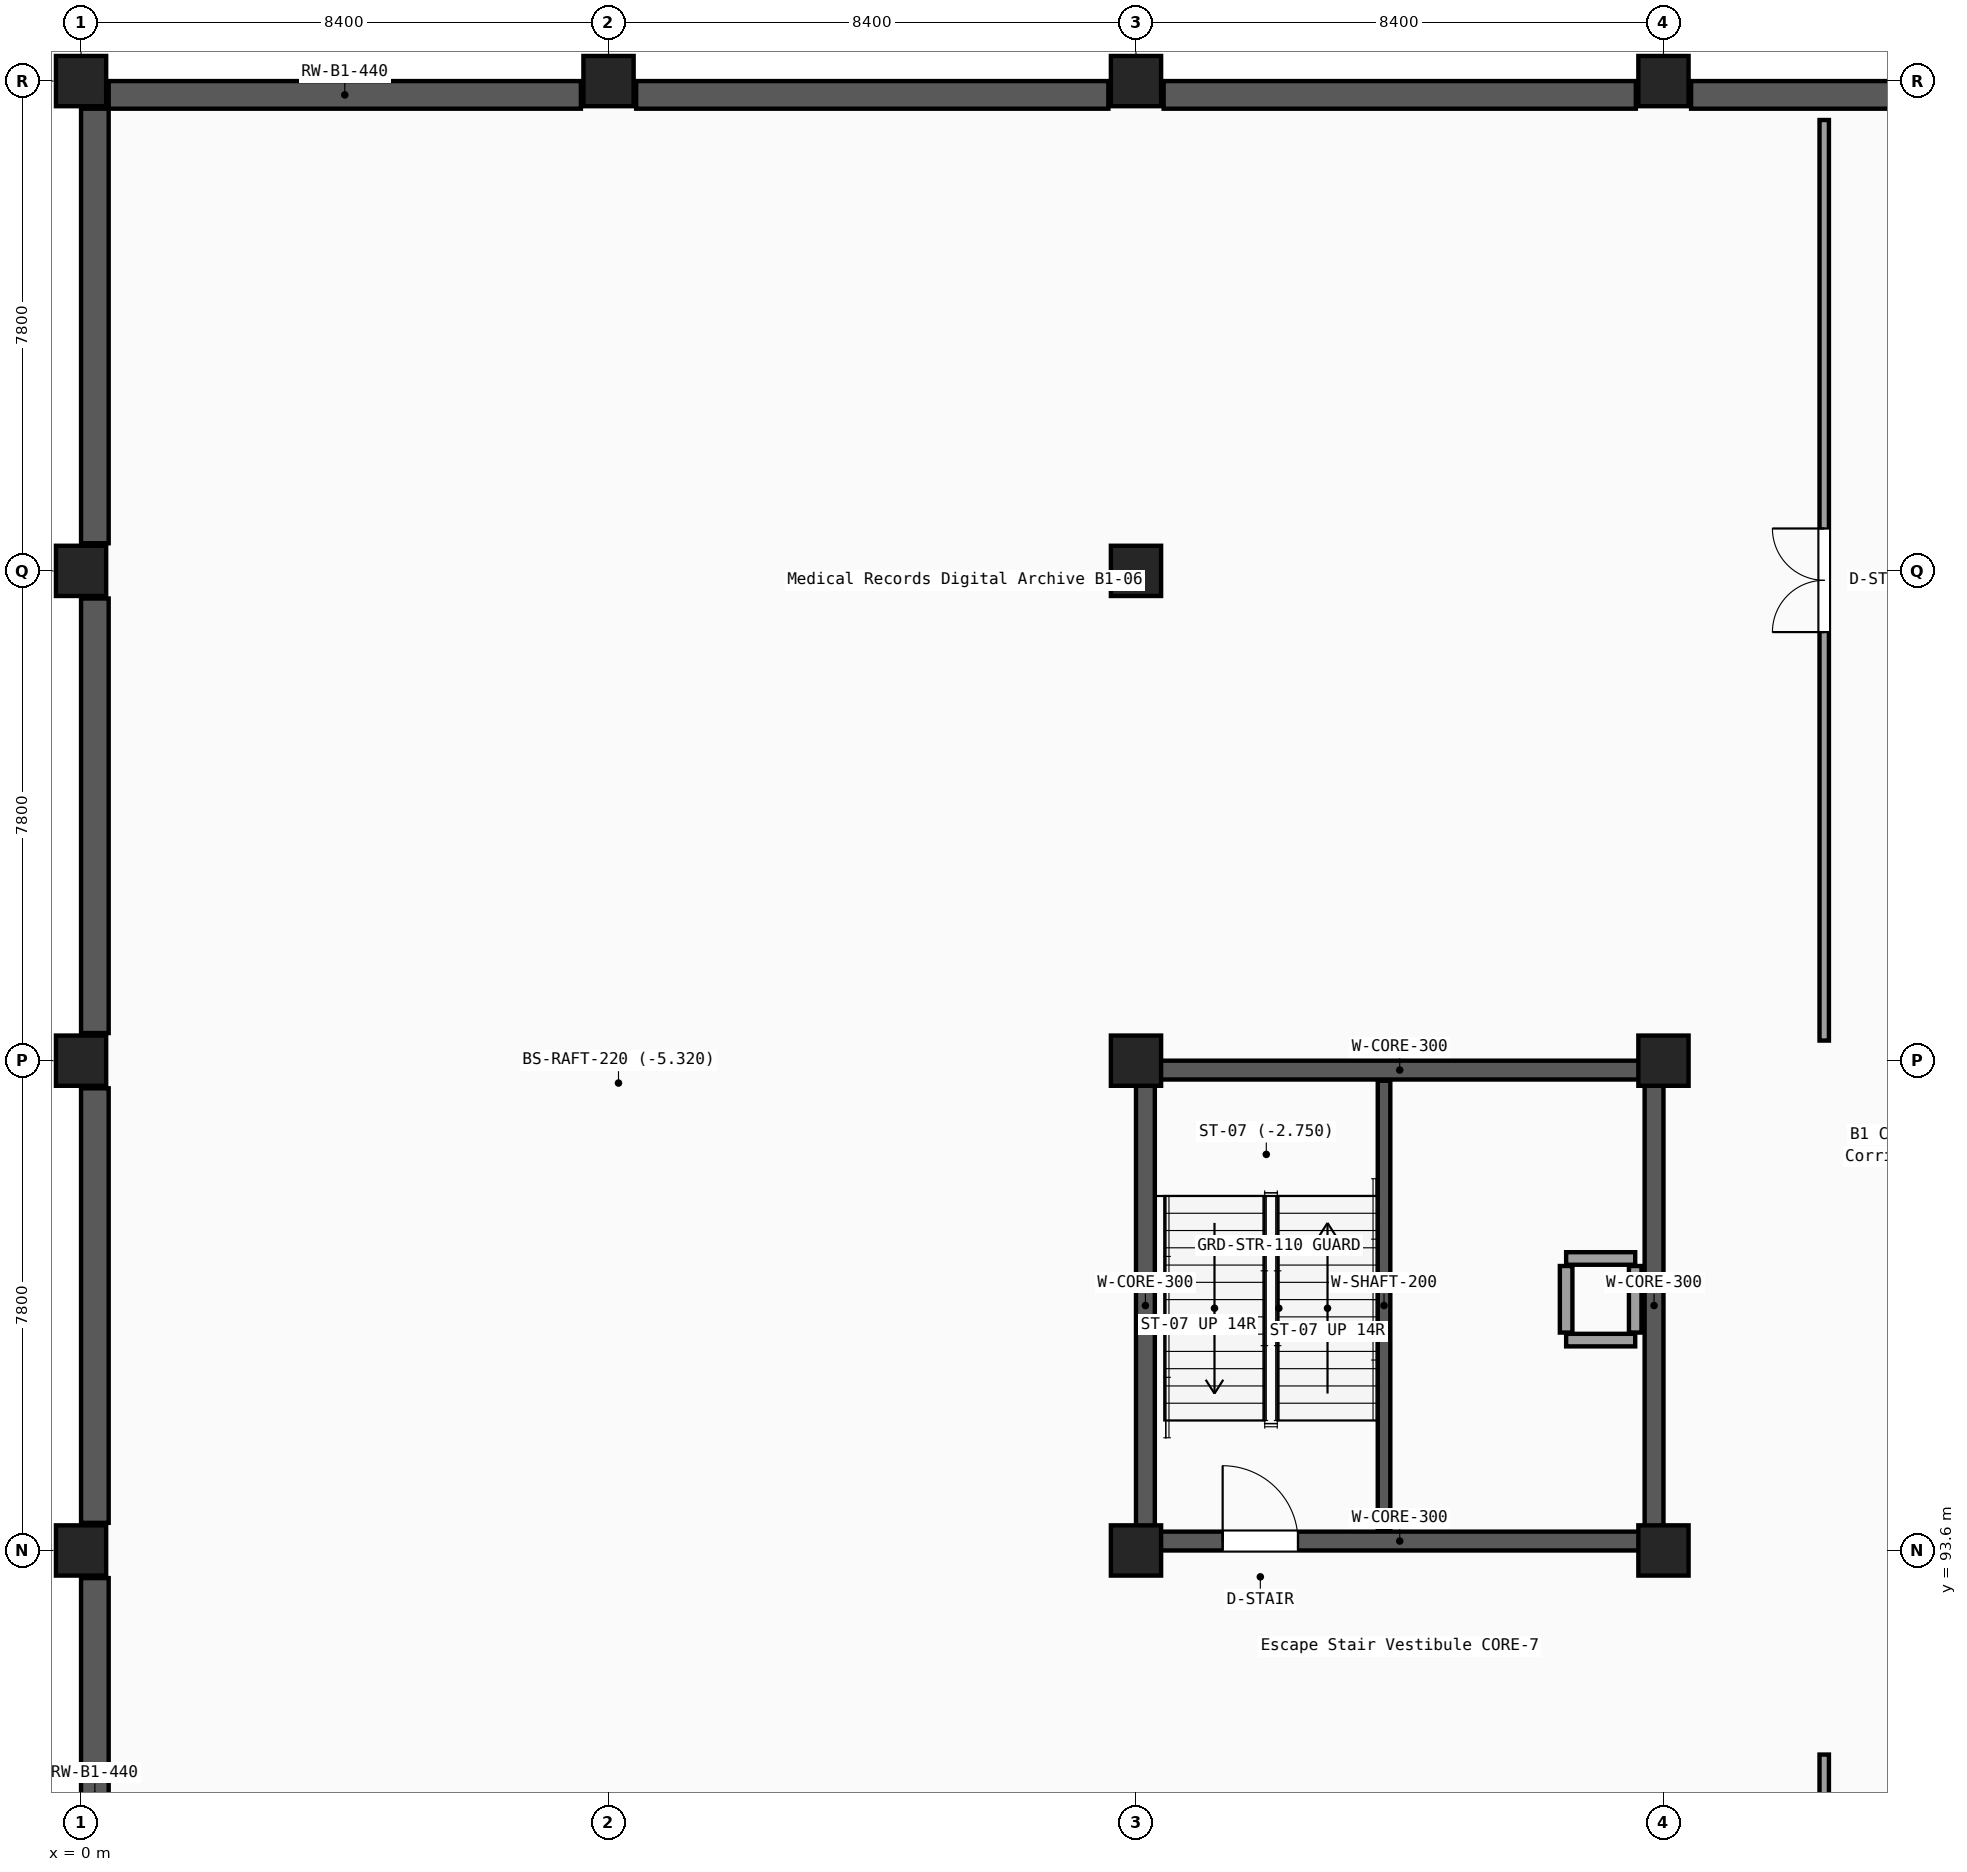
"""IFC4 building model, lengths in metres.
Left out: names, types, materials, properties, quantities, classifications, styles, units other than length and angle.
Written with IfcOpenShell. Run it as: python <this file> out.ifc"""

import sys

from ifc_helpers import new_model, si_unit, direction, frame, frame_2d, origin, origin_2d, place, context, subcontext, project, spatial, rectangle, extrude, element, fill, save


model = new_model("IFC4")
c1 = context("Model", 3, precision=1e-05, world=origin(), true_north=direction((0.0, 1.0)))
c2 = subcontext(c1, "Body", "Model", "MODEL_VIEW")
j1 = project(units=[si_unit("LENGTHUNIT", "METRE"), si_unit("PLANEANGLEUNIT", "RADIAN")], contexts=[c1])
p1 = place(None, origin())
s1 = spatial("IfcSite", under=j1, at=p1, CompositionType="ELEMENT")
p2 = place(p1, origin())
s2 = spatial("IfcBuilding", under=s1, at=p2, CompositionType="ELEMENT")
p3 = place(p2, frame((0.0, 0.0, -5.1)))
s3 = spatial("IfcBuildingStorey", under=s2, at=p3, CompositionType="ELEMENT", Elevation=-5.1)
for number, where, z_axis, x_axis in (
    (1, (0.0, 93.6, -0.22), (0.0, 0.0, 1.0), (1.0, 0.0, 0.0)),
    (2, (0.0, 101.4, -0.22), (0.0, 0.0, 1.0), (1.0, 0.0, 0.0)),
    (3, (0.0, 109.2, -0.22), (0.0, 0.0, 1.0), (1.0, 0.0, 0.0)),
    (4, (0.0, 117.0, -0.22), (0.0, 0.0, 1.0), (1.0, 0.0, 0.0)),
    (5, (8.4, 117.0, -0.22), (0.0, 0.0, 1.0), (1.0, 0.0, 0.0)),
    (6, (16.8, 93.6, -0.22), (0.0, 0.0, 1.0), (1.0, 0.0, 0.0)),
    (7, (16.8, 101.4, -0.22), (0.0, 0.0, 1.0), (1.0, 0.0, 0.0)),
    (8, (16.8, 109.2, -0.22), (0.0, 0.0, 1.0), (1.0, 0.0, 0.0)),
    (9, (16.8, 117.0, -0.22), (0.0, 0.0, 1.0), (1.0, 0.0, 0.0)),
    (10, (25.2, 93.6, -0.22), (0.0, 0.0, 1.0), (1.0, 0.0, 0.0)),
    (11, (25.2, 101.4, -0.22), (0.0, 0.0, 1.0), (1.0, 0.0, 0.0)),
    (12, (25.2, 117.0, -0.22), (0.0, 0.0, 1.0), (1.0, 0.0, 0.0)),
):
    element("IfcColumn", number, at=place(p3, frame(where, z_axis=z_axis, x_axis=x_axis)), inside=s3, PredefinedType="COLUMN", context=c2, shape_type="SweptSolid", body=[
        extrude(rectangle(XDim=0.8, YDim=0.8, at=origin_2d()), origin(), (0.0, 0.0, 1.0), 5.32),
    ])
p4 = place(p3, frame((0.22, 86.24, 0.0), z_axis=(0.0, 0.0, 1.0), x_axis=(0.0, 1.0, 0.0)))
e13 = element("IfcWall", 13, at=p4, inside=s3, PredefinedType="USERDEFINED", context=c2, shape_type="SweptSolid", body=[
    extrude(rectangle(XDim=6.92, YDim=0.44, at=frame_2d((3.46, 0.0))), origin(), (0.0, 0.0, 1.0), 4.28),
])
for number, where, z_axis, x_axis in (
    (14, (0.22, 94.04, 0.0), (0.0, 0.0, 1.0), (0.0, 1.0, 0.0)),
    (15, (0.22, 101.84, 0.0), (0.0, 0.0, 1.0), (0.0, 1.0, 0.0)),
):
    element("IfcWall", number, at=place(p3, frame(where, z_axis=z_axis, x_axis=x_axis)), inside=s3, PredefinedType="USERDEFINED", context=c2, shape_type="SweptSolid", body=[
        extrude(rectangle(XDim=6.92, YDim=0.44, at=frame_2d((3.46, 0.0))), origin(), (0.0, 0.0, 1.0), 4.23),
    ])
p5 = place(p3, frame((0.22, 109.64, 0.0), z_axis=(0.0, 0.0, 1.0), x_axis=(0.0, 1.0, 0.0)))
e16 = element("IfcWall", 16, at=p5, inside=s3, PredefinedType="USERDEFINED", context=c2, shape_type="SweptSolid", body=[
    extrude(rectangle(XDim=6.92, YDim=0.44, at=frame_2d((3.46, 0.0))), origin(), (0.0, 0.0, 1.0), 4.28),
])
p6 = place(p3, frame((0.44, 116.78, 0.0), z_axis=(0.0, 0.0, 1.0), x_axis=(1.0, 0.0, 0.0)))
e17 = element("IfcWall", 17, at=p6, inside=s3, PredefinedType="USERDEFINED", context=c2, shape_type="SweptSolid", body=[
    extrude(rectangle(XDim=7.52, YDim=0.44, at=frame_2d((3.76, 0.0))), origin(), (0.0, 0.0, 1.0), 4.44),
])
for number, where, z_axis, x_axis in (
    (18, (8.84, 116.78, 0.0), (0.0, 0.0, 1.0), (1.0, 0.0, 0.0)),
    (19, (17.24, 116.78, 0.0), (0.0, 0.0, 1.0), (1.0, 0.0, 0.0)),
    (20, (25.64, 116.78, 0.0), (0.0, 0.0, 1.0), (1.0, 0.0, 0.0)),
):
    element("IfcWall", number, at=place(p3, frame(where, z_axis=z_axis, x_axis=x_axis)), inside=s3, PredefinedType="USERDEFINED", context=c2, shape_type="SweptSolid", body=[
        extrude(rectangle(XDim=7.52, YDim=0.44, at=frame_2d((3.76, 0.0))), origin(), (0.0, 0.0, 1.0), 4.47),
    ])
p7 = place(p3, frame((16.8, 93.75, -0.22), z_axis=(0.0, 0.0, 1.0), x_axis=(1.0, 0.0, 0.0)))
e21 = element("IfcWall", 21, at=p7, inside=s3, PredefinedType="SHEAR", context=c2, shape_type="SweptSolid", body=[
    extrude(rectangle(XDim=8.4, YDim=0.3, at=frame_2d((4.2, 0.0))), origin(), (0.0, 0.0, 1.0), 5.07),
])
p8 = place(p7, frame((1.38, 0.0, 0.22)))
e22 = element("IfcOpeningElement", 22, at=p8, cuts=e21, PredefinedType="OPENING", context=c2, shape_type="SweptSolid", body=[
    extrude(rectangle(XDim=1.2, YDim=2.15, at=frame_2d((0.6, 1.075))), frame((0.0, 0.16, 0.0), z_axis=(0.0, -1.0, 0.0), x_axis=(1.0, 0.0, 0.0)), (0.0, 0.0, 1.0), 0.32),
])
p9 = place(p3, frame((16.8, 101.25, -0.22), z_axis=(0.0, 0.0, 1.0), x_axis=(1.0, 0.0, 0.0)))
e23 = element("IfcWall", 23, at=p9, inside=s3, PredefinedType="SHEAR", context=c2, shape_type="SweptSolid", body=[
    extrude(rectangle(XDim=8.4, YDim=0.3, at=frame_2d((4.2, 0.0))), origin(), (0.0, 0.0, 1.0), 5.07),
])
for number, where, z_axis, x_axis in (
    (24, (16.95, 93.9, -0.22), (0.0, 0.0, 1.0), (0.0, 1.0, 0.0)),
    (25, (25.05, 93.9, -0.22), (0.0, 0.0, 1.0), (0.0, 1.0, 0.0)),
):
    element("IfcWall", number, at=place(p3, frame(where, z_axis=z_axis, x_axis=x_axis)), inside=s3, PredefinedType="SHEAR", context=c2, shape_type="SweptSolid", body=[
        extrude(rectangle(XDim=7.2, YDim=0.3, at=frame_2d((3.6, 0.0))), origin(), (0.0, 0.0, 1.0), 5.07),
    ])
p10 = place(p3, frame((20.75, 93.92, -0.22), z_axis=(0.0, 0.0, 1.0), x_axis=(0.0, 1.0, 0.0)))
e26 = element("IfcWall", 26, at=p10, inside=s3, PredefinedType="SHEAR", context=c2, shape_type="SweptSolid", body=[
    extrude(rectangle(XDim=7.16, YDim=0.2, at=frame_2d((3.58, 0.0))), origin(), (0.0, 0.0, 1.0), 5.07),
])
for number, where, z_axis, x_axis in (
    (27, (23.65, 96.95, 0.0), (0.0, 0.0, 1.0), (1.0, 0.0, 0.0)),
    (28, (23.65, 98.25, 0.0), (0.0, 0.0, 1.0), (1.0, 0.0, 0.0)),
):
    element("IfcWall", number, at=place(p3, frame(where, z_axis=z_axis, x_axis=x_axis)), inside=s3, PredefinedType="PARTITIONING", context=c2, shape_type="SweptSolid", body=[
        extrude(rectangle(XDim=1.1, YDim=0.2, at=frame_2d((0.55, 0.0))), origin(), (0.0, 0.0, 1.0), 4.23),
    ])
for number, where, z_axis, x_axis in (
    (29, (23.65, 97.07, 0.0), (0.0, 0.0, 1.0), (0.0, 1.0, 0.0)),
    (30, (24.75, 97.07, 0.0), (0.0, 0.0, 1.0), (0.0, 1.0, 0.0)),
):
    element("IfcWall", number, at=place(p3, frame(where, z_axis=z_axis, x_axis=x_axis)), inside=s3, PredefinedType="PARTITIONING", context=c2, shape_type="SweptSolid", body=[
        extrude(rectangle(XDim=1.06, YDim=0.2, at=frame_2d((0.53, 0.0))), origin(), (0.0, 0.0, 1.0), 4.23),
    ])
p11 = place(p3, frame((27.76, 80.412, 0.0), z_axis=(0.0, 0.0, 1.0), x_axis=(0.0, 1.0, 0.0)))
e31 = element("IfcWall", 31, at=p11, inside=s3, PredefinedType="PARTITIONING", context=c2, shape_type="SweptSolid", body=[
    extrude(rectangle(XDim=9.938, YDim=0.15, at=frame_2d((4.969, 0.0))), origin(), (0.0, 0.0, 1.0), 4.47),
])
p12 = place(p11, frame((4.219, 0.0, 0.0)))
e32 = element("IfcOpeningElement", 32, at=p12, cuts=e31, PredefinedType="OPENING", context=c2, shape_type="SweptSolid", body=[
    extrude(rectangle(XDim=1.5, YDim=2.25, at=frame_2d((0.75, 1.125))), frame((0.0, 0.085, 0.0), z_axis=(0.0, -1.0, 0.0), x_axis=(1.0, 0.0, 0.0)), (0.0, 0.0, 1.0), 0.17),
])
p13 = place(p3, frame((27.76, 101.72, 0.0), z_axis=(0.0, 0.0, 1.0), x_axis=(0.0, 1.0, 0.0)))
e33 = element("IfcWall", 33, at=p13, inside=s3, PredefinedType="PARTITIONING", context=c2, shape_type="SweptSolid", body=[
    extrude(rectangle(XDim=14.66, YDim=0.15, at=frame_2d((7.33, 0.0))), origin(), (0.0, 0.0, 1.0), 4.28),
])
p14 = place(p13, frame((6.505, 0.0, 0.0)))
e34 = element("IfcOpeningElement", 34, at=p14, cuts=e33, PredefinedType="OPENING", context=c2, shape_type="SweptSolid", body=[
    extrude(rectangle(XDim=1.65, YDim=2.2, at=frame_2d((0.825, 1.1))), frame((0.0, 0.085, 0.0), z_axis=(0.0, -1.0, 0.0), x_axis=(1.0, 0.0, 0.0)), (0.0, 0.0, 1.0), 0.17),
])
p15 = place(p8, origin())
e35 = element("IfcDoor", 35, at=p15, inside=s3, OperationType="SINGLE_SWING_LEFT", PredefinedType="DOOR", context=c2, shape_type="SweptSolid", body=[
    extrude(rectangle(XDim=1.2, YDim=2.15, at=frame_2d((0.6, 1.075))), frame((0.0, 0.025, 0.0), z_axis=(0.0, -1.0, 0.0), x_axis=(1.0, 0.0, 0.0)), (0.0, 0.0, 1.0), 0.05),
])
fill(e22, e35)
p16 = place(p14, origin())
e36 = element("IfcDoor", 36, at=p16, inside=s3, OperationType="DOUBLE_DOOR_SINGLE_SWING", PredefinedType="DOOR", context=c2, shape_type="SweptSolid", body=[
    extrude(rectangle(XDim=1.65, YDim=2.2, at=frame_2d((0.825, 1.1))), frame((0.0, 0.025, 0.0), z_axis=(0.0, -1.0, 0.0), x_axis=(1.0, 0.0, 0.0)), (0.0, 0.0, 1.0), 0.05),
])
fill(e34, e36)
save(model, sys.argv[1])
